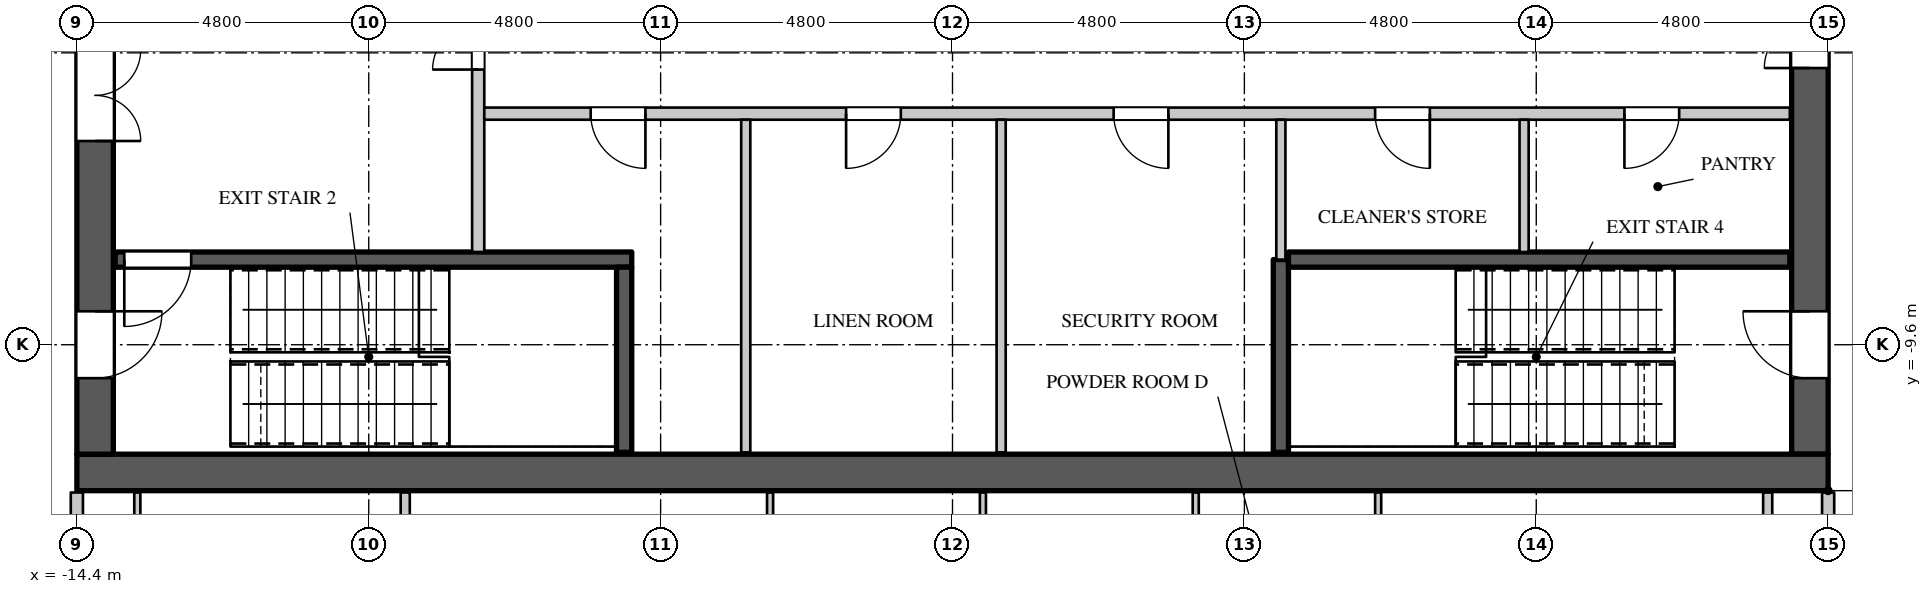
"""IFC4 building model, lengths in metres.
Left out: names, types, materials, properties, quantities, classifications, styles, units other than length and angle.
Written with IfcOpenShell. Run it as: python <this file> out.ifc"""

import sys

from ifc_helpers import new_model, si_unit, direction, frame, frame_2d, origin, place, context, subcontext, project, spatial, rectangle, extrude, element, fill, save


model = new_model("IFC4")
c1 = context("Model", 3, precision=1e-05, world=origin(), true_north=direction((0.0, 1.0)))
c2 = subcontext(c1, "Body", "Model", "MODEL_VIEW")
j1 = project(units=[si_unit("LENGTHUNIT", "METRE"), si_unit("PLANEANGLEUNIT", "RADIAN")], contexts=[c1])
p1 = place(None, origin())
s1 = spatial("IfcSite", under=j1, at=p1, CompositionType="ELEMENT")
p2 = place(p1, origin())
s2 = spatial("IfcBuilding", under=s1, at=p2, CompositionType="ELEMENT")
p3 = place(p2, frame((0.0, 0.0, 213.9)))
s3 = spatial("IfcBuildingStorey", under=s2, at=p3, CompositionType="ELEMENT", Elevation=213.9)
p4 = place(p3, frame((-14.4, -11.7, 0.0), z_axis=(0.0, 0.0, 1.0), x_axis=(1.0, 0.0, 0.0)))
e1 = element("IfcWall", 1, at=p4, inside=s3, PredefinedType="SHEAR", context=c2, shape_type="SweptSolid", body=[
    extrude(rectangle(XDim=28.8, YDim=0.6, at=frame_2d((14.4, 0.0))), origin(), (0.0, 0.0, 1.0), 4.2),
])
p5 = place(p3, frame((14.1, -11.4, 0.0), z_axis=(0.0, 0.0, 1.0), x_axis=(0.0, 1.0, 0.0)))
e2 = element("IfcWall", 2, at=p5, inside=s3, PredefinedType="SHEAR", context=c2, shape_type="SweptSolid", body=[
    extrude(rectangle(XDim=22.8, YDim=0.6, at=frame_2d((11.4, 0.0))), origin(), (0.0, 0.0, 1.0), 4.2),
])
p6 = place(p5, frame((20.45, 0.0, 0.0)))
e3 = element("IfcOpeningElement", 3, at=p6, cuts=e2, PredefinedType="OPENING", context=c2, shape_type="SweptSolid", body=[
    extrude(rectangle(XDim=1.1, YDim=2.2, at=frame_2d((0.55, 1.1))), frame((0.0, 0.31, 0.0), z_axis=(0.0, -1.0, 0.0), x_axis=(1.0, 0.0, 0.0)), (0.0, 0.0, 1.0), 0.62),
])
p7 = place(p5, frame((1.25, 0.0, 0.0)))
e4 = element("IfcOpeningElement", 4, at=p7, cuts=e2, PredefinedType="OPENING", context=c2, shape_type="SweptSolid", body=[
    extrude(rectangle(XDim=1.1, YDim=2.2, at=frame_2d((0.55, 1.1))), frame((0.0, 0.31, 0.0), z_axis=(0.0, -1.0, 0.0), x_axis=(1.0, 0.0, 0.0)), (0.0, 0.0, 1.0), 0.62),
])
p8 = place(p5, frame((14.95, 0.0, 0.0)))
e5 = element("IfcOpeningElement", 5, at=p8, cuts=e2, PredefinedType="OPENING", context=c2, shape_type="SweptSolid", body=[
    extrude(rectangle(XDim=1.5, YDim=2.4, at=frame_2d((0.75, 1.2))), frame((0.0, 0.31, 0.0), z_axis=(0.0, -1.0, 0.0), x_axis=(1.0, 0.0, 0.0)), (0.0, 0.0, 1.0), 0.62),
])
p9 = place(p5, frame((6.35, 0.0, 0.0)))
e6 = element("IfcOpeningElement", 6, at=p9, cuts=e2, PredefinedType="OPENING", context=c2, shape_type="SweptSolid", body=[
    extrude(rectangle(XDim=1.5, YDim=2.4, at=frame_2d((0.75, 1.2))), frame((0.0, 0.31, 0.0), z_axis=(0.0, -1.0, 0.0), x_axis=(1.0, 0.0, 0.0)), (0.0, 0.0, 1.0), 0.62),
])
p10 = place(p3, frame((-14.1, -11.4, 0.0), z_axis=(0.0, 0.0, 1.0), x_axis=(0.0, 1.0, 0.0)))
e7 = element("IfcWall", 7, at=p10, inside=s3, PredefinedType="SHEAR", context=c2, shape_type="SweptSolid", body=[
    extrude(rectangle(XDim=22.8, YDim=0.6, at=frame_2d((11.4, 0.0))), origin(), (0.0, 0.0, 1.0), 4.2),
])
p11 = place(p10, frame((20.45, 0.0, 0.0)))
e8 = element("IfcOpeningElement", 8, at=p11, cuts=e7, PredefinedType="OPENING", context=c2, shape_type="SweptSolid", body=[
    extrude(rectangle(XDim=1.1, YDim=2.2, at=frame_2d((0.55, 1.1))), frame((0.0, 0.31, 0.0), z_axis=(0.0, -1.0, 0.0), x_axis=(1.0, 0.0, 0.0)), (0.0, 0.0, 1.0), 0.62),
])
p12 = place(p10, frame((1.25, 0.0, 0.0)))
e9 = element("IfcOpeningElement", 9, at=p12, cuts=e7, PredefinedType="OPENING", context=c2, shape_type="SweptSolid", body=[
    extrude(rectangle(XDim=1.1, YDim=2.2, at=frame_2d((0.55, 1.1))), frame((0.0, 0.31, 0.0), z_axis=(0.0, -1.0, 0.0), x_axis=(1.0, 0.0, 0.0)), (0.0, 0.0, 1.0), 0.62),
])
p13 = place(p10, frame((16.15, 0.0, 0.0)))
e10 = element("IfcOpeningElement", 10, at=p13, cuts=e7, PredefinedType="OPENING", context=c2, shape_type="SweptSolid", body=[
    extrude(rectangle(XDim=1.5, YDim=2.4, at=frame_2d((0.75, 1.2))), frame((0.0, 0.31, 0.0), z_axis=(0.0, -1.0, 0.0), x_axis=(1.0, 0.0, 0.0)), (0.0, 0.0, 1.0), 0.62),
])
p14 = place(p10, frame((5.15, 0.0, 0.0)))
e11 = element("IfcOpeningElement", 11, at=p14, cuts=e7, PredefinedType="OPENING", context=c2, shape_type="SweptSolid", body=[
    extrude(rectangle(XDim=1.5, YDim=2.4, at=frame_2d((0.75, 1.2))), frame((0.0, 0.31, 0.0), z_axis=(0.0, -1.0, 0.0), x_axis=(1.0, 0.0, 0.0)), (0.0, 0.0, 1.0), 0.62),
])
p15 = place(p3, frame((-14.4, -14.3, 0.0), z_axis=(0.0, 0.0, 1.0), x_axis=(0.0, 1.0, 0.0)))
e12 = element("IfcWall", 12, at=p15, inside=s3, PredefinedType="PARTITIONING", context=c2, shape_type="SweptSolid", body=[
    extrude(rectangle(XDim=2.27, YDim=0.2, at=frame_2d((1.135, 0.0))), origin(), (0.0, 0.0, 1.0), 3.95),
])
p16 = place(p3, frame((-7.8, -8.075, 0.0), z_axis=(0.0, 0.0, 1.0), x_axis=(0.0, 1.0, 0.0)))
e13 = element("IfcWall", 13, at=p16, inside=s3, PredefinedType="PARTITIONING", context=c2, shape_type="SweptSolid", body=[
    extrude(rectangle(XDim=5.275, YDim=0.2, at=frame_2d((2.637, 0.0))), origin(), (0.0, 0.0, 1.0), 3.95),
])
p17 = place(p16, frame((3.0, 0.0, 0.0)))
e14 = element("IfcOpeningElement", 14, at=p17, cuts=e13, PredefinedType="OPENING", context=c2, shape_type="SweptSolid", body=[
    extrude(rectangle(XDim=1.5, YDim=2.4, at=frame_2d((0.75, 1.2))), frame((0.0, 0.11, 0.0), z_axis=(0.0, -1.0, 0.0), x_axis=(1.0, 0.0, 0.0)), (0.0, 0.0, 1.0), 0.22),
])
p18 = place(p3, frame((-7.7, -5.8, 0.0), z_axis=(0.0, 0.0, 1.0), x_axis=(1.0, 0.0, 0.0)))
e15 = element("IfcWall", 15, at=p18, inside=s3, PredefinedType="PARTITIONING", context=c2, shape_type="SweptSolid", body=[
    extrude(rectangle(XDim=21.47, YDim=0.2, at=frame_2d((10.735, 0.0))), origin(), (0.0, 0.0, 1.0), 3.95),
])
p19 = place(p18, frame((1.75, 0.0, 0.0)))
e16 = element("IfcOpeningElement", 16, at=p19, cuts=e15, PredefinedType="OPENING", context=c2, shape_type="SweptSolid", body=[
    extrude(rectangle(XDim=0.9, YDim=2.2, at=frame_2d((0.45, 1.1))), frame((0.0, 0.11, 0.0), z_axis=(0.0, -1.0, 0.0), x_axis=(1.0, 0.0, 0.0)), (0.0, 0.0, 1.0), 0.22),
])
p20 = place(p18, frame((5.95, 0.0, 0.0)))
e17 = element("IfcOpeningElement", 17, at=p20, cuts=e15, PredefinedType="OPENING", context=c2, shape_type="SweptSolid", body=[
    extrude(rectangle(XDim=0.9, YDim=2.2, at=frame_2d((0.45, 1.1))), frame((0.0, 0.11, 0.0), z_axis=(0.0, -1.0, 0.0), x_axis=(1.0, 0.0, 0.0)), (0.0, 0.0, 1.0), 0.22),
])
p21 = place(p18, frame((10.35, 0.0, 0.0)))
e18 = element("IfcOpeningElement", 18, at=p21, cuts=e15, PredefinedType="OPENING", context=c2, shape_type="SweptSolid", body=[
    extrude(rectangle(XDim=0.9, YDim=2.2, at=frame_2d((0.45, 1.1))), frame((0.0, 0.11, 0.0), z_axis=(0.0, -1.0, 0.0), x_axis=(1.0, 0.0, 0.0)), (0.0, 0.0, 1.0), 0.22),
])
p22 = place(p18, frame((14.65, 0.0, 0.0)))
e19 = element("IfcOpeningElement", 19, at=p22, cuts=e15, PredefinedType="OPENING", context=c2, shape_type="SweptSolid", body=[
    extrude(rectangle(XDim=0.9, YDim=2.2, at=frame_2d((0.45, 1.1))), frame((0.0, 0.11, 0.0), z_axis=(0.0, -1.0, 0.0), x_axis=(1.0, 0.0, 0.0)), (0.0, 0.0, 1.0), 0.22),
])
p23 = place(p18, frame((18.75, 0.0, 0.0)))
e20 = element("IfcOpeningElement", 20, at=p23, cuts=e15, PredefinedType="OPENING", context=c2, shape_type="SweptSolid", body=[
    extrude(rectangle(XDim=0.9, YDim=2.2, at=frame_2d((0.45, 1.1))), frame((0.0, 0.11, 0.0), z_axis=(0.0, -1.0, 0.0), x_axis=(1.0, 0.0, 0.0)), (0.0, 0.0, 1.0), 0.22),
])
p24 = place(p3, frame((14.4, -14.3, 0.0), z_axis=(0.0, 0.0, 1.0), x_axis=(0.0, 1.0, 0.0)))
e21 = element("IfcWall", 21, at=p24, inside=s3, PredefinedType="PARTITIONING", context=c2, shape_type="SweptSolid", body=[
    extrude(rectangle(XDim=2.27, YDim=0.2, at=frame_2d((1.135, 0.0))), origin(), (0.0, 0.0, 1.0), 3.95),
])
p25 = place(p3, frame((-9.0, -18.425, 0.0), z_axis=(0.0, 0.0, 1.0), x_axis=(0.0, 1.0, 0.0)))
e22 = element("IfcWall", 22, at=p25, inside=s3, PredefinedType="PARTITIONING", context=c2, shape_type="SweptSolid", body=[
    extrude(rectangle(XDim=6.395, YDim=0.15, at=frame_2d((3.198, 0.0))), origin(), (0.0, 0.0, 1.0), 3.95),
])
for number, where, z_axis, x_axis in (
    (23, (-3.4, -11.37, 0.0), (0.0, 0.0, 1.0), (0.0, 1.0, 0.0)),
    (24, (0.8, -11.37, 0.0), (0.0, 0.0, 1.0), (0.0, 1.0, 0.0)),
):
    element("IfcWall", number, at=place(p3, frame(where, z_axis=z_axis, x_axis=x_axis)), inside=s3, PredefinedType="PARTITIONING", context=c2, shape_type="SweptSolid", body=[
        extrude(rectangle(XDim=5.47, YDim=0.15, at=frame_2d((2.735, 0.0))), origin(), (0.0, 0.0, 1.0), 3.95),
    ])
p26 = place(p3, frame((5.4, -8.2, 0.0), z_axis=(0.0, 0.0, 1.0), x_axis=(0.0, 1.0, 0.0)))
e25 = element("IfcWall", 25, at=p26, inside=s3, PredefinedType="PARTITIONING", context=c2, shape_type="SweptSolid", body=[
    extrude(rectangle(XDim=2.3, YDim=0.15, at=frame_2d((1.15, 0.0))), origin(), (0.0, 0.0, 1.0), 3.95),
])
p27 = place(p3, frame((9.4, -8.075, 0.0), z_axis=(0.0, 0.0, 1.0), x_axis=(0.0, 1.0, 0.0)))
e26 = element("IfcWall", 26, at=p27, inside=s3, PredefinedType="PARTITIONING", context=c2, shape_type="SweptSolid", body=[
    extrude(rectangle(XDim=2.175, YDim=0.15, at=frame_2d((1.087, 0.0))), origin(), (0.0, 0.0, 1.0), 3.95),
])
p28 = place(p3, frame((13.406, -25.731, 0.0), z_axis=(0.0, 0.0, 1.0), x_axis=(0.0, 1.0, 0.0)))
e27 = element("IfcWall", 27, at=p28, inside=s3, PredefinedType="PARTITIONING", context=c2, shape_type="SweptSolid", body=[
    extrude(rectangle(XDim=13.701, YDim=0.15, at=frame_2d((6.851, 0.0))), origin(), (0.0, 0.0, 1.0), 3.3),
])
p29 = place(p28, frame((9.7, 0.0, 0.0)))
e28 = element("IfcOpeningElement", 28, at=p29, cuts=e27, PredefinedType="OPENING", context=c2, shape_type="SweptSolid", body=[
    extrude(rectangle(XDim=1.5, YDim=2.2, at=frame_2d((0.75, 1.1))), frame((0.0, 0.085, 0.0), z_axis=(0.0, -1.0, 0.0), x_axis=(1.0, 0.0, 0.0)), (0.0, 0.0, 1.0), 0.17),
])
p30 = place(p3, frame((-13.77, -8.2, 0.0), z_axis=(0.0, 0.0, 1.0), x_axis=(1.0, 0.0, 0.0)))
e29 = element("IfcWall", 29, at=p30, inside=s3, PredefinedType="SHEAR", context=c2, shape_type="SweptSolid", body=[
    extrude(rectangle(XDim=8.495, YDim=0.25, at=frame_2d((4.248, 0.0))), origin(), (0.0, 0.0, 1.0), 3.95),
])
p31 = place(p30, frame((0.15, 0.0, 0.0)))
e30 = element("IfcOpeningElement", 30, at=p31, cuts=e29, PredefinedType="OPENING", context=c2, shape_type="SweptSolid", body=[
    extrude(rectangle(XDim=1.1, YDim=2.2, at=frame_2d((0.55, 1.1))), frame((0.0, 0.135, 0.0), z_axis=(0.0, -1.0, 0.0), x_axis=(1.0, 0.0, 0.0)), (0.0, 0.0, 1.0), 0.27),
])
p32 = place(p3, frame((-5.4, -11.37, 0.0), z_axis=(0.0, 0.0, 1.0), x_axis=(0.0, 1.0, 0.0)))
e31 = element("IfcWall", 31, at=p32, inside=s3, PredefinedType="SHEAR", context=c2, shape_type="SweptSolid", body=[
    extrude(rectangle(XDim=3.045, YDim=0.25, at=frame_2d((1.522, 0.0))), origin(), (0.0, 0.0, 1.0), 3.95),
])
p33 = place(p3, frame((5.4, -11.37, 0.0), z_axis=(0.0, 0.0, 1.0), x_axis=(0.0, 1.0, 0.0)))
e32 = element("IfcWall", 32, at=p33, inside=s3, PredefinedType="SHEAR", context=c2, shape_type="SweptSolid", body=[
    extrude(rectangle(XDim=3.17, YDim=0.25, at=frame_2d((1.585, 0.0))), origin(), (0.0, 0.0, 1.0), 3.95),
])
p34 = place(p3, frame((5.525, -8.2, 0.0), z_axis=(0.0, 0.0, 1.0), x_axis=(1.0, 0.0, 0.0)))
e33 = element("IfcWall", 33, at=p34, inside=s3, PredefinedType="SHEAR", context=c2, shape_type="SweptSolid", body=[
    extrude(rectangle(XDim=8.245, YDim=0.25, at=frame_2d((4.123, 0.0))), origin(), (0.0, 0.0, 1.0), 3.95),
])
p35 = place(p3, frame((-13.406, -16.6, 0.0), z_axis=(0.0, 0.0, 1.0), x_axis=(0.0, 1.0, 0.0)))
e34 = element("IfcWall", 34, at=p35, inside=s3, PredefinedType="PARTITIONING", context=c2, shape_type="SweptSolid", body=[
    extrude(rectangle(XDim=4.57, YDim=0.1, at=frame_2d((2.285, 0.0))), origin(), (0.0, 0.0, 1.0), 3.3),
])
p36 = place(p3, frame((-3.0, -18.45, 0.0), z_axis=(0.0, 0.0, 1.0), x_axis=(0.0, 1.0, 0.0)))
e35 = element("IfcWall", 35, at=p36, inside=s3, PredefinedType="PARTITIONING", context=c2, shape_type="SweptSolid", body=[
    extrude(rectangle(XDim=6.42, YDim=0.1, at=frame_2d((3.21, 0.0))), origin(), (0.0, 0.0, 1.0), 3.95),
])
p37 = place(p36, frame((2.75, 0.0, 0.0)))
e36 = element("IfcOpeningElement", 36, at=p37, cuts=e35, PredefinedType="OPENING", context=c2, shape_type="SweptSolid", body=[
    extrude(rectangle(XDim=0.9, YDim=2.2, at=frame_2d((0.45, 1.1))), frame((0.0, 0.06, 0.0), z_axis=(0.0, -1.0, 0.0), x_axis=(1.0, 0.0, 0.0)), (0.0, 0.0, 1.0), 0.12),
])
p38 = place(p3, frame((0.5, -18.425, 0.0), z_axis=(0.0, 0.0, 1.0), x_axis=(0.0, 1.0, 0.0)))
e37 = element("IfcWall", 37, at=p38, inside=s3, PredefinedType="PARTITIONING", context=c2, shape_type="SweptSolid", body=[
    extrude(rectangle(XDim=6.395, YDim=0.1, at=frame_2d((3.198, 0.0))), origin(), (0.0, 0.0, 1.0), 3.95),
])
p39 = place(p38, frame((2.75, 0.0, 0.0)))
e38 = element("IfcOpeningElement", 38, at=p39, cuts=e37, PredefinedType="OPENING", context=c2, shape_type="SweptSolid", body=[
    extrude(rectangle(XDim=0.9, YDim=2.2, at=frame_2d((0.45, 1.1))), frame((0.0, 0.06, 0.0), z_axis=(0.0, -1.0, 0.0), x_axis=(1.0, 0.0, 0.0)), (0.0, 0.0, 1.0), 0.12),
])
p40 = place(p3, frame((4.0, -18.45, 0.0), z_axis=(0.0, 0.0, 1.0), x_axis=(0.0, 1.0, 0.0)))
e39 = element("IfcWall", 39, at=p40, inside=s3, PredefinedType="PARTITIONING", context=c2, shape_type="SweptSolid", body=[
    extrude(rectangle(XDim=6.42, YDim=0.1, at=frame_2d((3.21, 0.0))), origin(), (0.0, 0.0, 1.0), 3.95),
])
p41 = place(p3, frame((7.0, -17.475, 0.0), z_axis=(0.0, 0.0, 1.0), x_axis=(0.0, 1.0, 0.0)))
e40 = element("IfcWall", 40, at=p41, inside=s3, PredefinedType="PARTITIONING", context=c2, shape_type="SweptSolid", body=[
    extrude(rectangle(XDim=5.445, YDim=0.1, at=frame_2d((2.723, 0.0))), origin(), (0.0, 0.0, 1.0), 3.95),
])
p42 = place(p41, frame((2.25, 0.0, 0.0)))
e41 = element("IfcOpeningElement", 41, at=p42, cuts=e40, PredefinedType="OPENING", context=c2, shape_type="SweptSolid", body=[
    extrude(rectangle(XDim=0.9, YDim=2.2, at=frame_2d((0.45, 1.1))), frame((0.0, 0.06, 0.0), z_axis=(0.0, -1.0, 0.0), x_axis=(1.0, 0.0, 0.0)), (0.0, 0.0, 1.0), 0.12),
])
p43 = place(p19, origin())
e42 = element("IfcDoor", 42, at=p43, inside=s3, OperationType="SINGLE_SWING_LEFT", PredefinedType="DOOR", context=c2, shape_type="SweptSolid", body=[
    extrude(rectangle(XDim=0.9, YDim=2.2, at=frame_2d((0.45, 1.1))), frame((0.0, 0.025, 0.0), z_axis=(0.0, -1.0, 0.0), x_axis=(1.0, 0.0, 0.0)), (0.0, 0.0, 1.0), 0.05),
])
fill(e16, e42)
p44 = place(p20, origin())
e43 = element("IfcDoor", 43, at=p44, inside=s3, OperationType="SINGLE_SWING_RIGHT", PredefinedType="DOOR", context=c2, shape_type="SweptSolid", body=[
    extrude(rectangle(XDim=0.9, YDim=2.2, at=frame_2d((0.45, 1.1))), frame((0.0, 0.025, 0.0), z_axis=(0.0, -1.0, 0.0), x_axis=(1.0, 0.0, 0.0)), (0.0, 0.0, 1.0), 0.05),
])
fill(e17, e43)
p45 = place(p21, origin())
e44 = element("IfcDoor", 44, at=p45, inside=s3, OperationType="SINGLE_SWING_LEFT", PredefinedType="DOOR", context=c2, shape_type="SweptSolid", body=[
    extrude(rectangle(XDim=0.9, YDim=2.2, at=frame_2d((0.45, 1.1))), frame((0.0, 0.025, 0.0), z_axis=(0.0, -1.0, 0.0), x_axis=(1.0, 0.0, 0.0)), (0.0, 0.0, 1.0), 0.05),
])
fill(e18, e44)
p46 = place(p22, origin())
e45 = element("IfcDoor", 45, at=p46, inside=s3, OperationType="SINGLE_SWING_LEFT", PredefinedType="DOOR", context=c2, shape_type="SweptSolid", body=[
    extrude(rectangle(XDim=0.9, YDim=2.2, at=frame_2d((0.45, 1.1))), frame((0.0, 0.025, 0.0), z_axis=(0.0, -1.0, 0.0), x_axis=(1.0, 0.0, 0.0)), (0.0, 0.0, 1.0), 0.05),
])
fill(e19, e45)
p47 = place(p23, origin())
e46 = element("IfcDoor", 46, at=p47, inside=s3, OperationType="SINGLE_SWING_RIGHT", PredefinedType="DOOR", context=c2, shape_type="SweptSolid", body=[
    extrude(rectangle(XDim=0.9, YDim=2.2, at=frame_2d((0.45, 1.1))), frame((0.0, 0.025, 0.0), z_axis=(0.0, -1.0, 0.0), x_axis=(1.0, 0.0, 0.0)), (0.0, 0.0, 1.0), 0.05),
])
fill(e20, e46)
p48 = place(p31, origin())
e47 = element("IfcDoor", 47, at=p48, inside=s3, OperationType="SINGLE_SWING_RIGHT", PredefinedType="DOOR", context=c2, shape_type="SweptSolid", body=[
    extrude(rectangle(XDim=1.1, YDim=2.2, at=frame_2d((0.55, 1.1))), frame((0.0, 0.025, 0.0), z_axis=(0.0, -1.0, 0.0), x_axis=(1.0, 0.0, 0.0)), (0.0, 0.0, 1.0), 0.05),
])
fill(e30, e47)
p49 = place(p17, origin())
e48 = element("IfcDoor", 48, at=p49, inside=s3, OperationType="DOUBLE_DOOR_SINGLE_SWING", PredefinedType="DOOR", context=c2, shape_type="SweptSolid", body=[
    extrude(rectangle(XDim=1.5, YDim=2.4, at=frame_2d((0.75, 1.2))), frame((0.0, 0.025, 0.0), z_axis=(0.0, -1.0, 0.0), x_axis=(1.0, 0.0, 0.0)), (0.0, 0.0, 1.0), 0.05),
])
fill(e14, e48)
p50 = place(p12, origin())
e49 = element("IfcDoor", 49, at=p50, inside=s3, OperationType="SINGLE_SWING_LEFT", PredefinedType="DOOR", context=c2, shape_type="SweptSolid", body=[
    extrude(rectangle(XDim=1.1, YDim=2.2, at=frame_2d((0.55, 1.1))), frame((0.0, -0.245, 0.0), z_axis=(0.0, -1.0, 0.0), x_axis=(1.0, 0.0, 0.0)), (0.0, 0.0, 1.0), 0.05),
])
fill(e9, e49)
p51 = place(p7, origin())
e50 = element("IfcDoor", 50, at=p51, inside=s3, OperationType="SINGLE_SWING_RIGHT", PredefinedType="DOOR", context=c2, shape_type="SweptSolid", body=[
    extrude(rectangle(XDim=1.1, YDim=2.2, at=frame_2d((0.55, 1.1))), frame((0.0, 0.295, 0.0), z_axis=(0.0, -1.0, 0.0), x_axis=(1.0, 0.0, 0.0)), (0.0, 0.0, 1.0), 0.05),
])
fill(e4, e50)
p52 = place(p14, origin())
e51 = element("IfcDoor", 51, at=p52, inside=s3, OperationType="DOUBLE_DOOR_SINGLE_SWING", PredefinedType="DOOR", context=c2, shape_type="SweptSolid", body=[
    extrude(rectangle(XDim=1.5, YDim=2.4, at=frame_2d((0.75, 1.2))), frame((0.0, -0.245, 0.0), z_axis=(0.0, -1.0, 0.0), x_axis=(1.0, 0.0, 0.0)), (0.0, 0.0, 1.0), 0.05),
])
fill(e11, e51)
p53 = place(p9, origin())
e52 = element("IfcDoor", 52, at=p53, inside=s3, OperationType="DOUBLE_DOOR_SINGLE_SWING", PredefinedType="DOOR", context=c2, shape_type="SweptSolid", body=[
    extrude(rectangle(XDim=1.5, YDim=2.4, at=frame_2d((0.75, 1.2))), frame((0.0, 0.295, 0.0), z_axis=(0.0, -1.0, 0.0), x_axis=(1.0, 0.0, 0.0)), (0.0, 0.0, 1.0), 0.05),
])
fill(e6, e52)
save(model, sys.argv[1])
